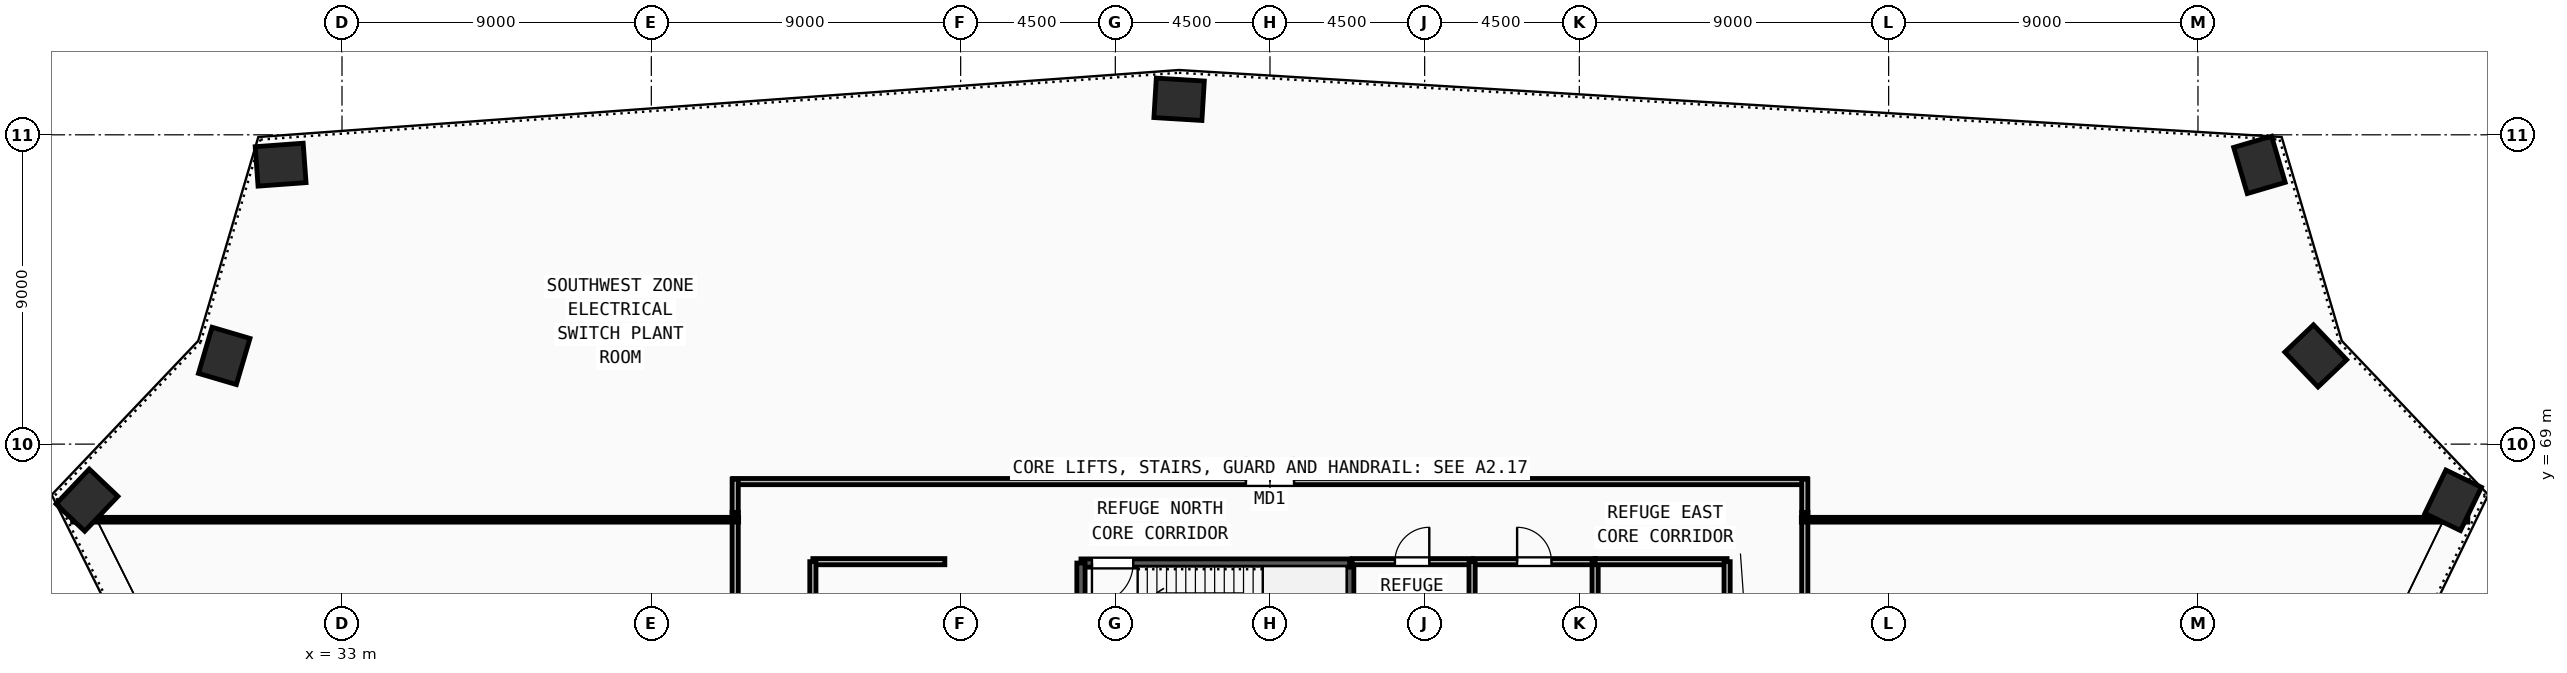
"""IFC4 building model, lengths in metres.
Left out: names, types, materials, properties, quantities, classifications, styles, units other than length and angle.
Written with IfcOpenShell. Run it as: python <this file> out.ifc"""

import sys

from ifc_helpers import new_model, si_unit, direction, frame, frame_2d, origin, origin_2d, place, context, subcontext, project, spatial, rectangle, extrude, source, transform, mapped, element, fill, save


model = new_model("IFC4")
c1 = context("Model", 3, precision=1e-05, world=origin(), true_north=direction((0.0, 1.0)))
c2 = subcontext(c1, "Body", "Model", "MODEL_VIEW")
j1 = project(units=[si_unit("LENGTHUNIT", "METRE"), si_unit("PLANEANGLEUNIT", "RADIAN")], contexts=[c1])
p1 = place(None, origin())
s1 = spatial("IfcSite", under=j1, at=p1, CompositionType="ELEMENT")
p2 = place(p1, origin())
s2 = spatial("IfcBuilding", under=s1, at=p2, CompositionType="ELEMENT")
p3 = place(p2, frame((0.0, 0.0, 185.25)))
s3 = spatial("IfcBuildingStorey", under=s2, at=p3, CompositionType="ELEMENT", Elevation=185.25)
m1 = source(origin(), c2, "Body", "SweptSolid", [
    extrude(rectangle(XDim=1.4, YDim=1.15, at=origin_2d()), origin(), (0.0, 0.0, 1.0), 4.5),
])
for number, where, z_axis, x_axis in (
    (1, (25.58, 67.37, 0.0), (0.0, 0.0, 1.0), (0.689, 0.724, 0.0)),
    (2, (29.573, 71.567, 0.0), (0.0, 0.0, 1.0), (0.283, 0.959, 0.0)),
    (3, (31.214, 77.131, 0.0), (0.0, 0.0, 1.0), (0.997, 0.073, 0.0)),
    (4, (57.356, 79.033, 0.0), (0.0, 0.0, 1.0), (-0.998, 0.061, 0.0)),
    (5, (88.788, 77.124, 0.0), (0.0, 0.0, 1.0), (-0.283, 0.959, 0.0)),
    (6, (90.427, 71.567, 0.0), (0.0, 0.0, 1.0), (-0.689, 0.724, 0.0)),
    (7, (94.425, 67.365, 0.0), (0.0, 0.0, 1.0), (0.436, 0.9, 0.0)),
):
    element("IfcColumn", number, at=place(p3, frame(where, z_axis=z_axis, x_axis=x_axis)), inside=s3, PredefinedType="COLUMN", context=c2, shape_type="MappedRepresentation", body=[
        mapped(m1, transform((0.0, 0.0, 0.0), x_axis=(1.0, 0.0, 0.0), y_axis=(0.0, 1.0, 0.0), z_axis=(0.0, 0.0, 1.0), scale=1.0)),
    ])
p4 = place(p3, frame((62.32, 62.1, 0.0), z_axis=(0.0, 0.0, 1.0), x_axis=(0.0, 1.0, 0.0)))
e8 = element("IfcWall", 8, at=p4, inside=s3, PredefinedType="SOLIDWALL", context=c2, shape_type="SweptSolid", body=[
    extrude(rectangle(XDim=3.44, YDim=0.24, at=frame_2d((1.72, 0.0))), origin(), (0.0, 0.0, 1.0), 4.22),
])
p5 = place(p3, frame((62.32, 65.54, 0.0), z_axis=(0.0, 0.0, 1.0), x_axis=(-1.0, 0.0, 0.0)))
e9 = element("IfcWall", 9, at=p5, inside=s3, PredefinedType="SOLIDWALL", context=c2, shape_type="SweptSolid", body=[
    extrude(rectangle(XDim=7.82, YDim=0.24, at=frame_2d((3.91, 0.0))), origin(), (0.0, 0.0, 1.0), 4.22),
])
m2 = source(origin(), c2, "Body", "SweptSolid", [
    extrude(rectangle(XDim=1.2, YDim=2.2, at=frame_2d((0.6, 1.1))), frame((0.0, 0.13, 0.0), z_axis=(0.0, -1.0, 0.0), x_axis=(1.0, 0.0, 0.0)), (0.0, 0.0, 1.0), 0.26),
])
p6 = place(p5, frame((6.3, 0.0, 0.0)))
e10 = element("IfcOpeningElement", 10, at=p6, cuts=e9, PredefinedType="OPENING", context=c2, shape_type="MappedRepresentation", body=[
    mapped(m2, transform((0.0, 0.0, 0.0), x_axis=(1.0, 0.0, 0.0), y_axis=(0.0, 1.0, 0.0), z_axis=(0.0, 0.0, 1.0), scale=1.0)),
])
p7 = place(p3, frame((54.5, 65.54, 0.0), z_axis=(0.0, 0.0, 1.0), x_axis=(0.0, -1.0, 0.0)))
e11 = element("IfcWall", 11, at=p7, inside=s3, PredefinedType="SOLIDWALL", context=c2, shape_type="SweptSolid", body=[
    extrude(rectangle(XDim=3.44, YDim=0.24, at=frame_2d((1.72, 0.0))), origin(), (0.0, 0.0, 1.0), 4.22),
])
p8 = place(p3, frame((62.39, 65.58, 0.0), z_axis=(0.0, 0.0, 1.0), x_axis=(1.0, 0.0, 0.0)))
e12 = element("IfcWall", 12, at=p8, inside=s3, PredefinedType="PARTITIONING", context=c2, shape_type="SweptSolid", body=[
    extrude(rectangle(XDim=3.49, YDim=0.18, at=frame_2d((1.745, 0.0))), origin(), (0.0, 0.0, 1.0), 4.22),
])
m3 = source(origin(), c2, "Body", "SweptSolid", [
    extrude(rectangle(XDim=1.0, YDim=2.2, at=frame_2d((0.5, 1.1))), frame((0.0, 0.1, 0.0), z_axis=(0.0, -1.0, 0.0), x_axis=(1.0, 0.0, 0.0)), (0.0, 0.0, 1.0), 0.2),
])
p9 = place(p8, frame((1.245, 0.0, 0.0)))
e13 = element("IfcOpeningElement", 13, at=p9, cuts=e12, PredefinedType="OPENING", context=c2, shape_type="MappedRepresentation", body=[
    mapped(m3, transform((0.0, 0.0, 0.0), x_axis=(1.0, 0.0, 0.0), y_axis=(0.0, 1.0, 0.0), z_axis=(0.0, 0.0, 1.0), scale=1.0)),
])
p10 = place(p3, frame((65.92, 65.58, 0.0), z_axis=(0.0, 0.0, 1.0), x_axis=(1.0, 0.0, 0.0)))
e14 = element("IfcWall", 14, at=p10, inside=s3, PredefinedType="PARTITIONING", context=c2, shape_type="SweptSolid", body=[
    extrude(rectangle(XDim=3.54, YDim=0.18, at=frame_2d((1.77, 0.0))), origin(), (0.0, 0.0, 1.0), 4.22),
])
p11 = place(p10, frame((1.27, 0.0, 0.0)))
e15 = element("IfcOpeningElement", 15, at=p11, cuts=e14, PredefinedType="OPENING", context=c2, shape_type="MappedRepresentation", body=[
    mapped(m3, transform((0.0, 0.0, 0.0), x_axis=(1.0, 0.0, 0.0), y_axis=(0.0, 1.0, 0.0), z_axis=(0.0, 0.0, 1.0), scale=1.0)),
])
p12 = place(p3, frame((75.56, 67.015, 0.0), z_axis=(0.0, 0.0, 1.0), x_axis=(0.0, -1.0, 0.0)))
e16 = element("IfcWall", 16, at=p12, inside=s3, PredefinedType="PARTITIONING", context=c2, shape_type="SweptSolid", body=[
    extrude(rectangle(XDim=22.43, YDim=0.18, at=frame_2d((11.215, 0.0))), origin(), (0.0, 0.0, 1.0), 3.805),
])
m4 = source(origin(), c2, "Body", "SweptSolid", [
    extrude(rectangle(XDim=1.3, YDim=2.2, at=frame_2d((0.65, 1.1))), frame((0.0, 0.1, 0.0), z_axis=(0.0, -1.0, 0.0), x_axis=(1.0, 0.0, 0.0)), (0.0, 0.0, 1.0), 0.2),
])
p13 = place(p12, frame((10.565, 0.0, 0.0)))
e17 = element("IfcOpeningElement", 17, at=p13, cuts=e16, PredefinedType="OPENING", context=c2, shape_type="MappedRepresentation", body=[
    mapped(m4, transform((0.0, 0.0, 0.0), x_axis=(1.0, 0.0, 0.0), y_axis=(0.0, 1.0, 0.0), z_axis=(0.0, 0.0, 1.0), scale=1.0)),
])
p14 = place(p3, frame((44.37, 67.91, 0.0), z_axis=(0.0, 0.0, 1.0), x_axis=(1.0, 0.0, 0.0)))
e18 = element("IfcWall", 18, at=p14, inside=s3, PredefinedType="PARTITIONING", context=c2, shape_type="SweptSolid", body=[
    extrude(rectangle(XDim=31.26, YDim=0.18, at=frame_2d((15.63, 0.0))), origin(), (0.0, 0.0, 1.0), 4.22),
])
m5 = source(origin(), c2, "Body", "SweptSolid", [
    extrude(rectangle(XDim=1.4, YDim=2.25, at=frame_2d((0.7, 1.125))), frame((0.0, 0.1, 0.0), z_axis=(0.0, -1.0, 0.0), x_axis=(1.0, 0.0, 0.0)), (0.0, 0.0, 1.0), 0.2),
])
p15 = place(p14, frame((14.93, 0.0, 0.0)))
e19 = element("IfcOpeningElement", 19, at=p15, cuts=e18, PredefinedType="OPENING", context=c2, shape_type="MappedRepresentation", body=[
    mapped(m5, transform((0.0, 0.0, 0.0), x_axis=(1.0, 0.0, 0.0), y_axis=(0.0, 1.0, 0.0), z_axis=(0.0, 0.0, 1.0), scale=1.0)),
])
p16 = place(p3, frame((44.44, 55.98, 0.0), z_axis=(0.0, 0.0, 1.0), x_axis=(0.0, 1.0, 0.0)))
e20 = element("IfcWall", 20, at=p16, inside=s3, PredefinedType="PARTITIONING", context=c2, shape_type="SweptSolid", body=[
    extrude(rectangle(XDim=11.035, YDim=0.18, at=frame_2d((5.518, 0.0))), origin(), (0.0, 0.0, 1.0), 4.22),
])
p17 = place(p16, frame((4.518, 0.0, 0.0)))
e21 = element("IfcOpeningElement", 21, at=p17, cuts=e20, PredefinedType="OPENING", context=c2, shape_type="MappedRepresentation", body=[
    mapped(m5, transform((0.0, 0.0, 0.0), x_axis=(1.0, 0.0, 0.0), y_axis=(0.0, 1.0, 0.0), z_axis=(0.0, 0.0, 1.0), scale=1.0)),
])
p18 = place(p3, frame((65.88, 61.875, 0.0), z_axis=(0.0, 0.0, 1.0), x_axis=(0.0, 1.0, 0.0)))
e22 = element("IfcWall", 22, at=p18, inside=s3, PredefinedType="PARTITIONING", context=c2, shape_type="SweptSolid", body=[
    extrude(rectangle(XDim=3.705, YDim=0.18, at=frame_2d((1.853, 0.0))), origin(), (0.0, 0.0, 1.0), 4.22),
])
p19 = place(p3, frame((69.46, 61.95, 0.0), z_axis=(0.0, 0.0, 1.0), x_axis=(0.0, 1.0, 0.0)))
e23 = element("IfcWall", 23, at=p19, inside=s3, PredefinedType="PARTITIONING", context=c2, shape_type="SweptSolid", body=[
    extrude(rectangle(XDim=3.63, YDim=0.18, at=frame_2d((1.815, 0.0))), origin(), (0.0, 0.0, 1.0), 4.22),
])
for number, where, z_axis, x_axis in (
    (24, (46.7, 65.58, 0.0), (0.0, 0.0, 1.0), (1.0, 0.0, 0.0)),
    (25, (69.46, 65.58, 0.0), (0.0, 0.0, 1.0), (1.0, 0.0, 0.0)),
):
    element("IfcWall", number, at=place(p3, frame(where, z_axis=z_axis, x_axis=x_axis)), inside=s3, PredefinedType="PARTITIONING", context=c2, shape_type="SweptSolid", body=[
        extrude(rectangle(XDim=3.84, YDim=0.18, at=frame_2d((1.92, 0.0))), origin(), (0.0, 0.0, 1.0), 4.22),
    ])
for number, where, z_axis, x_axis in (
    (26, (46.7, 60.06, 0.0), (0.0, 0.0, 1.0), (0.0, 1.0, 0.0)),
    (27, (73.3, 60.06, 0.0), (0.0, 0.0, 1.0), (0.0, 1.0, 0.0)),
):
    element("IfcWall", number, at=place(p3, frame(where, z_axis=z_axis, x_axis=x_axis)), inside=s3, PredefinedType="PARTITIONING", context=c2, shape_type="SweptSolid", body=[
        extrude(rectangle(XDim=5.52, YDim=0.18, at=frame_2d((2.76, 0.0))), origin(), (0.0, 0.0, 1.0), 4.22),
    ])
for number, where, z_axis, x_axis in (
    (28, (44.44, 67.015, 0.0), (0.0, 0.0, 1.0), (0.0, 1.0, 0.0)),
    (29, (75.56, 67.98, 0.0), (0.0, 0.0, 1.0), (0.0, -1.0, 0.0)),
):
    element("IfcWall", number, at=place(p3, frame(where, z_axis=z_axis, x_axis=x_axis)), inside=s3, PredefinedType="PARTITIONING", context=c2, shape_type="SweptSolid", body=[
        extrude(rectangle(XDim=0.965, YDim=0.18, at=frame_2d((0.482, 0.0))), origin(), (0.0, 0.0, 1.0), 4.22),
    ])
p20 = place(p3, frame((44.54, 66.8, 0.0), z_axis=(0.0, 0.0, 1.0), x_axis=(-1.0, 0.0, 0.0)))
e30 = element("IfcWall", 30, at=p20, inside=s3, PredefinedType="PARTITIONING", context=c2, shape_type="SweptSolid", body=[
    extrude(rectangle(XDim=19.38, YDim=0.14, at=frame_2d((9.69, 0.0))), origin(), (0.0, 0.0, 1.0), 3.405),
])
p21 = place(p3, frame((75.46, 66.8, 0.0), z_axis=(0.0, 0.0, 1.0), x_axis=(1.0, 0.0, 0.0)))
e31 = element("IfcWall", 31, at=p21, inside=s3, PredefinedType="PARTITIONING", context=c2, shape_type="SweptSolid", body=[
    extrude(rectangle(XDim=19.392, YDim=0.14, at=frame_2d((9.696, 0.0))), origin(), (0.0, 0.0, 1.0), 3.405),
])
m6 = source(origin(), c2, "Body", "SweptSolid", [
    extrude(rectangle(XDim=1.2, YDim=2.2, at=frame_2d((0.6, 1.1))), frame((0.0, 0.025, 0.0), z_axis=(0.0, -1.0, 0.0), x_axis=(1.0, 0.0, 0.0)), (0.0, 0.0, 1.0), 0.05),
])
p22 = place(p6, origin())
e32 = element("IfcDoor", 32, at=p22, inside=s3, OperationType="SINGLE_SWING_RIGHT", PredefinedType="DOOR", context=c2, shape_type="MappedRepresentation", body=[
    mapped(m6, transform((0.0, 0.0, 0.0), x_axis=(1.0, 0.0, 0.0), y_axis=(0.0, 1.0, 0.0), z_axis=(0.0, 0.0, 1.0), scale=1.0)),
])
fill(e10, e32)
m7 = source(origin(), c2, "Body", "SweptSolid", [
    extrude(rectangle(XDim=1.0, YDim=2.2, at=frame_2d((0.5, 1.1))), frame((0.0, 0.025, 0.0), z_axis=(0.0, -1.0, 0.0), x_axis=(1.0, 0.0, 0.0)), (0.0, 0.0, 1.0), 0.05),
])
p23 = place(p9, origin())
e33 = element("IfcDoor", 33, at=p23, inside=s3, OperationType="SINGLE_SWING_RIGHT", PredefinedType="DOOR", context=c2, shape_type="MappedRepresentation", body=[
    mapped(m7, transform((0.0, 0.0, 0.0), x_axis=(1.0, 0.0, 0.0), y_axis=(0.0, 1.0, 0.0), z_axis=(0.0, 0.0, 1.0), scale=1.0)),
])
fill(e13, e33)
p24 = place(p11, origin())
e34 = element("IfcDoor", 34, at=p24, inside=s3, OperationType="SINGLE_SWING_LEFT", PredefinedType="DOOR", context=c2, shape_type="MappedRepresentation", body=[
    mapped(m7, transform((0.0, 0.0, 0.0), x_axis=(1.0, 0.0, 0.0), y_axis=(0.0, 1.0, 0.0), z_axis=(0.0, 0.0, 1.0), scale=1.0)),
])
fill(e15, e34)
m8 = source(origin(), c2, "Body", "SweptSolid", [
    extrude(rectangle(XDim=1.4, YDim=2.25, at=frame_2d((0.7, 1.125))), frame((0.0, 0.025, 0.0), z_axis=(0.0, -1.0, 0.0), x_axis=(1.0, 0.0, 0.0)), (0.0, 0.0, 1.0), 0.05),
])
p25 = place(p15, origin())
e35 = element("IfcDoor", 35, at=p25, inside=s3, OperationType="DOUBLE_DOOR_SINGLE_SWING", PredefinedType="DOOR", context=c2, shape_type="MappedRepresentation", body=[
    mapped(m8, transform((0.0, 0.0, 0.0), x_axis=(1.0, 0.0, 0.0), y_axis=(0.0, 1.0, 0.0), z_axis=(0.0, 0.0, 1.0), scale=1.0)),
])
fill(e19, e35)
save(model, sys.argv[1])
